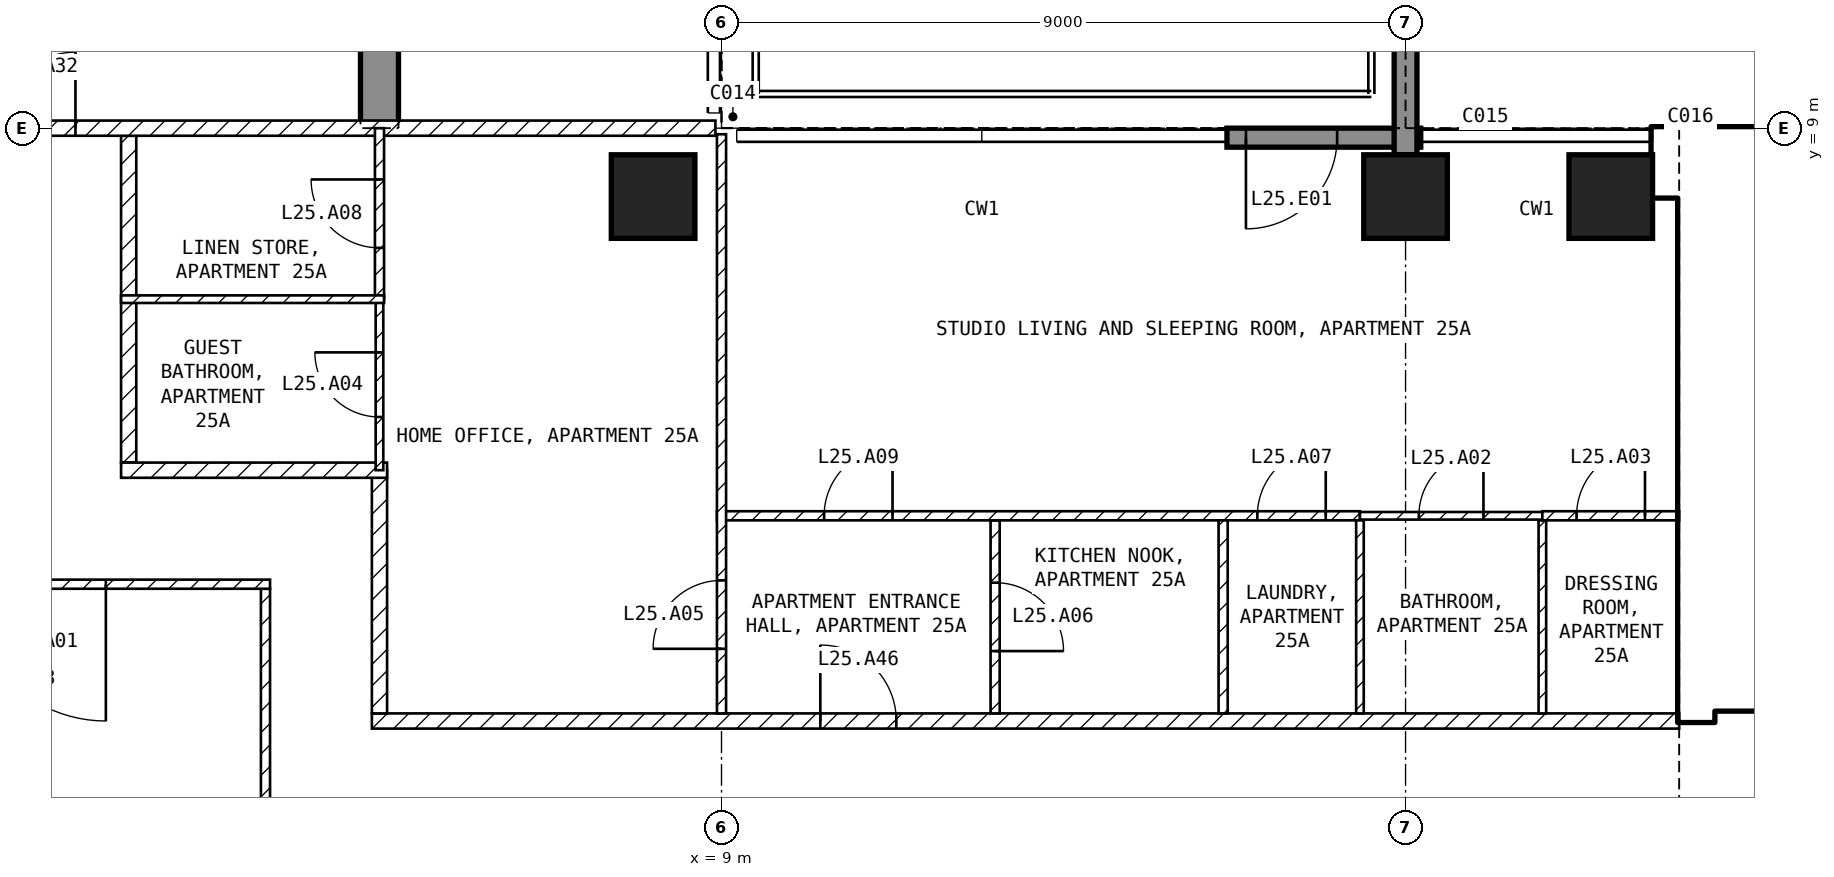
"""IFC4 building model, lengths in metres.
Left out: names, types, materials, properties, quantities, classifications, styles, units other than length and angle.
Written with IfcOpenShell. Run it as: python <this file> out.ifc"""

import sys

from ifc_helpers import new_model, si_unit, direction, frame, frame_2d, origin, origin_2d, place, context, subcontext, project, spatial, polyline, rectangle, outline, extrude, element, fill, save


model = new_model("IFC4")
c1 = context("Model", 3, precision=1e-05, world=origin(), true_north=direction((0.0, 1.0)))
c2 = subcontext(c1, "Body", "Model", "MODEL_VIEW")
j1 = project(units=[si_unit("LENGTHUNIT", "METRE"), si_unit("PLANEANGLEUNIT", "RADIAN")], contexts=[c1])
p1 = place(None, origin())
s1 = spatial("IfcSite", under=j1, at=p1, CompositionType="ELEMENT")
p2 = place(p1, origin())
s2 = spatial("IfcBuilding", under=s1, at=p2, CompositionType="ELEMENT")
p3 = place(p2, frame((0.0, 0.0, 109.4)))
s3 = spatial("IfcBuildingStorey", under=s2, at=p3, CompositionType="ELEMENT", Elevation=109.4)
for number, where, z_axis, x_axis in (
    (1, (8.1, 8.1, -0.25), (0.0, 0.0, 1.0), (1.0, 0.0, 0.0)),
    (2, (18.0, 8.1, -0.25), (0.0, 0.0, 1.0), (1.0, 0.0, 0.0)),
    (3, (20.7, 8.1, -0.25), (0.0, 0.0, 1.0), (1.0, 0.0, 0.0)),
):
    element("IfcColumn", number, at=place(p3, frame(where, z_axis=z_axis, x_axis=x_axis)), inside=s3, PredefinedType="COLUMN", context=c2, shape_type="SweptSolid", body=[
        extrude(rectangle(XDim=1.1, YDim=1.1, at=origin_2d()), origin(), (0.0, 0.0, 1.0), 3.5),
    ])
p4 = place(p3, frame((4.25, 9.0, -0.25), z_axis=(1.0, 0.0, 0.0), x_axis=(0.0, 1.0, 0.0)))
e4 = element("IfcWall", 4, at=p4, inside=s3, PredefinedType="SHEAR", context=c2, shape_type="SweptSolid", body=[
    extrude(outline(polyline([(0.0, 0.0), (2.1, 0.0), (2.1, 2.65), (4.5, 2.65), (4.5, 0.0), (9.9, 0.0), (9.9, 2.65), (12.3, 2.65), (12.3, 0.0), (16.55, 0.0), (16.55, 3.5), (0.0, 3.5), (0.0, 0.0)])), origin(), (0.0, 0.0, 1.0), 0.5),
])
p5 = place(p3, frame((18.2, 8.875, 0.0), z_axis=(0.0, 0.0, 1.0), x_axis=(-1.0, 0.0, 0.0)))
e5 = element("IfcWall", 5, at=p5, inside=s3, PredefinedType="SOLIDWALL", context=c2, shape_type="SweptSolid", body=[
    extrude(rectangle(XDim=2.55, YDim=0.25, at=frame_2d((1.275, 0.0))), origin(), (0.0, 0.0, 1.0), 3.25),
])
p6 = place(p5, frame((1.1, 0.0, 0.0)))
e6 = element("IfcOpeningElement", 6, at=p6, cuts=e5, PredefinedType="OPENING", context=c2, shape_type="SweptSolid", body=[
    extrude(rectangle(XDim=1.2, YDim=2.4, at=frame_2d((0.6, 1.2))), frame((0.0, 0.135, 0.0), z_axis=(0.0, -1.0, 0.0), x_axis=(1.0, 0.0, 0.0)), (0.0, 0.0, 1.0), 0.27),
])
p7 = place(p3, frame((18.0, 8.65, 0.0), z_axis=(0.0, 0.0, 1.0), x_axis=(0.0, 1.0, 0.0)))
e7 = element("IfcWall", 7, at=p7, inside=s3, PredefinedType="SOLIDWALL", context=c2, shape_type="SweptSolid", body=[
    extrude(rectangle(XDim=3.09, YDim=0.3, at=frame_2d((1.545, 0.0))), origin(), (0.0, 0.0, 1.0), 3.25),
])
p8 = place(p3, frame((21.25, 8.55, 0.0), z_axis=(0.0, 0.0, 1.0), x_axis=(1.0, 0.0, 0.0)))
e8 = element("IfcWall", 8, at=p8, inside=s3, PredefinedType="SHEAR", context=c2, shape_type="SweptSolid", body=[
    extrude(rectangle(XDim=8.2, YDim=0.9, at=frame_2d((4.1, 0.0))), origin(), (0.0, 0.0, 1.0), 3.25),
])
p9 = place(p3, frame((21.825, 1.2, 0.0), z_axis=(0.0, 0.0, 1.0), x_axis=(0.0, 1.0, 0.0)))
e9 = element("IfcWall", 9, at=p9, inside=s3, PredefinedType="SHEAR", context=c2, shape_type="SweptSolid", body=[
    extrude(rectangle(XDim=6.9, YDim=0.45, at=frame_2d((3.45, 0.0))), origin(), (0.0, 0.0, 1.0), 3.25),
])
p10 = place(p3, frame((22.05, 1.45, 0.0), z_axis=(0.0, 0.0, 1.0), x_axis=(1.0, 0.0, 0.0)))
e10 = element("IfcWall", 10, at=p10, inside=s3, PredefinedType="SOLIDWALL", context=c2, shape_type="SweptSolid", body=[
    extrude(rectangle(XDim=11.0, YDim=0.2, at=frame_2d((5.5, 0.0))), origin(), (0.0, 0.0, 1.0), 3.25),
])
p11 = place(p10, frame((0.75, 0.0, 0.0)))
e11 = element("IfcOpeningElement", 11, at=p11, cuts=e10, PredefinedType="OPENING", context=c2, shape_type="SweptSolid", body=[
    extrude(rectangle(XDim=1.0, YDim=2.1, at=frame_2d((0.5, 1.05))), frame((0.0, 0.11, 0.0), z_axis=(0.0, -1.0, 0.0), x_axis=(1.0, 0.0, 0.0)), (0.0, 0.0, 1.0), 0.22),
])
p12 = place(p10, frame((3.25, 0.0, 0.0)))
e12 = element("IfcOpeningElement", 12, at=p12, cuts=e10, PredefinedType="OPENING", context=c2, shape_type="SweptSolid", body=[
    extrude(rectangle(XDim=1.0, YDim=2.1, at=frame_2d((0.5, 1.05))), frame((0.0, 0.11, 0.0), z_axis=(0.0, -1.0, 0.0), x_axis=(1.0, 0.0, 0.0)), (0.0, 0.0, 1.0), 0.22),
])
p13 = place(p10, frame((9.075, 0.0, 0.0)))
e13 = element("IfcOpeningElement", 13, at=p13, cuts=e10, PredefinedType="OPENING", context=c2, shape_type="SweptSolid", body=[
    extrude(rectangle(XDim=0.9, YDim=2.1, at=frame_2d((0.45, 1.05))), frame((0.0, 0.11, 0.0), z_axis=(0.0, -1.0, 0.0), x_axis=(1.0, 0.0, 0.0)), (0.0, 0.0, 1.0), 0.22),
])
p14 = place(p3, frame((22.05, 5.15, 0.0), z_axis=(0.0, 0.0, 1.0), x_axis=(1.0, 0.0, 0.0)))
e14 = element("IfcWall", 14, at=p14, inside=s3, PredefinedType="SOLIDWALL", context=c2, shape_type="SweptSolid", body=[
    extrude(rectangle(XDim=6.3, YDim=0.2, at=frame_2d((3.15, 0.0))), origin(), (0.0, 0.0, 1.0), 3.25),
])
p15 = place(p14, frame((0.2, 0.0, 0.0)))
e15 = element("IfcOpeningElement", 15, at=p15, cuts=e14, PredefinedType="OPENING", context=c2, shape_type="SweptSolid", body=[
    extrude(rectangle(XDim=1.0, YDim=2.1, at=frame_2d((0.5, 1.05))), frame((0.0, 0.11, 0.0), z_axis=(0.0, -1.0, 0.0), x_axis=(1.0, 0.0, 0.0)), (0.0, 0.0, 1.0), 0.22),
])
p16 = place(p3, frame((3.0, -2.94, 0.0), z_axis=(0.0, 0.0, 1.0), x_axis=(0.0, 1.0, 0.0)))
e16 = element("IfcWall", 16, at=p16, inside=s3, PredefinedType="PARTITIONING", context=c2, shape_type="SweptSolid", body=[
    extrude(rectangle(XDim=5.88, YDim=0.12, at=frame_2d((2.94, 0.0))), origin(), (0.0, 0.0, 1.0), 3.25),
])
p17 = place(p3, frame((3.06, 3.0, 0.0), z_axis=(0.0, 0.0, 1.0), x_axis=(-1.0, 0.0, 0.0)))
e17 = element("IfcWall", 17, at=p17, inside=s3, PredefinedType="PARTITIONING", context=c2, shape_type="SweptSolid", body=[
    extrude(rectangle(XDim=6.12, YDim=0.12, at=frame_2d((3.06, 0.0))), origin(), (0.0, 0.0, 1.0), 3.25),
])
p18 = place(p17, frame((2.16, 0.0, 0.0)))
e18 = element("IfcOpeningElement", 18, at=p18, cuts=e17, PredefinedType="OPENING", context=c2, shape_type="SweptSolid", body=[
    extrude(rectangle(XDim=1.8, YDim=2.1, at=frame_2d((0.9, 1.05))), frame((0.0, 0.07, 0.0), z_axis=(0.0, -1.0, 0.0), x_axis=(1.0, 0.0, 0.0)), (0.0, 0.0, 1.0), 0.14),
])
p19 = place(p3, frame((4.4, 1.2, 0.0), z_axis=(0.0, 0.0, 1.0), x_axis=(1.0, 0.0, 0.0)))
e19 = element("IfcWall", 19, at=p19, inside=s3, PredefinedType="PARTITIONING", context=c2, shape_type="SweptSolid", body=[
    extrude(rectangle(XDim=17.2, YDim=0.2, at=frame_2d((8.6, 0.0))), origin(), (0.0, 0.0, 1.0), 3.25),
])
p20 = place(p19, frame((5.9, 0.0, 0.0)))
e20 = element("IfcOpeningElement", 20, at=p20, cuts=e19, PredefinedType="OPENING", context=c2, shape_type="SweptSolid", body=[
    extrude(rectangle(XDim=1.0, YDim=2.1, at=frame_2d((0.5, 1.05))), frame((0.0, 0.11, 0.0), z_axis=(0.0, -1.0, 0.0), x_axis=(1.0, 0.0, 0.0)), (0.0, 0.0, 1.0), 0.22),
])
p21 = place(p3, frame((4.5, 4.5, 0.0), z_axis=(0.0, 0.0, 1.0), x_axis=(0.0, -1.0, 0.0)))
e21 = element("IfcWall", 21, at=p21, inside=s3, PredefinedType="PARTITIONING", context=c2, shape_type="SweptSolid", body=[
    extrude(rectangle(XDim=3.2, YDim=0.2, at=frame_2d((1.6, 0.0))), origin(), (0.0, 0.0, 1.0), 3.25),
])
p22 = place(p3, frame((1.2, 8.9, 0.0), z_axis=(0.0, 0.0, 1.0), x_axis=(0.0, -1.0, 0.0)))
e22 = element("IfcWall", 22, at=p22, inside=s3, PredefinedType="PARTITIONING", context=c2, shape_type="SweptSolid", body=[
    extrude(rectangle(XDim=4.3, YDim=0.2, at=frame_2d((2.15, 0.0))), origin(), (0.0, 0.0, 1.0), 3.25),
])
p23 = place(p3, frame((1.1, 4.5, 0.0), z_axis=(0.0, 0.0, 1.0), x_axis=(1.0, 0.0, 0.0)))
e23 = element("IfcWall", 23, at=p23, inside=s3, PredefinedType="PARTITIONING", context=c2, shape_type="SweptSolid", body=[
    extrude(rectangle(XDim=3.5, YDim=0.2, at=frame_2d((1.75, 0.0))), origin(), (0.0, 0.0, 1.0), 3.25),
])
p24 = place(p3, frame((-8.92, 9.0, 0.0), z_axis=(0.0, 0.0, 1.0), x_axis=(1.0, 0.0, 0.0)))
e24 = element("IfcWall", 24, at=p24, inside=s3, PredefinedType="PARTITIONING", context=c2, shape_type="SweptSolid", body=[
    extrude(rectangle(XDim=17.84, YDim=0.2, at=frame_2d((8.92, 0.0))), origin(), (0.0, 0.0, 1.0), 3.25),
])
p25 = place(p24, frame((8.42, 0.0, 0.0)))
e25 = element("IfcOpeningElement", 25, at=p25, cuts=e24, PredefinedType="OPENING", context=c2, shape_type="SweptSolid", body=[
    extrude(rectangle(XDim=1.0, YDim=2.1, at=frame_2d((0.5, 1.05))), frame((0.0, 0.11, 0.0), z_axis=(0.0, -1.0, 0.0), x_axis=(1.0, 0.0, 0.0)), (0.0, 0.0, 1.0), 0.22),
])
p26 = place(p3, frame((12.6, 3.84, 0.0), z_axis=(0.0, 0.0, 1.0), x_axis=(0.0, -1.0, 0.0)))
e26 = element("IfcWall", 26, at=p26, inside=s3, PredefinedType="PARTITIONING", context=c2, shape_type="SweptSolid", body=[
    extrude(rectangle(XDim=2.54, YDim=0.12, at=frame_2d((1.27, 0.0))), origin(), (0.0, 0.0, 1.0), 3.25),
])
p27 = place(p26, frame((0.82, 0.0, 0.0)))
e27 = element("IfcOpeningElement", 27, at=p27, cuts=e26, PredefinedType="OPENING", context=c2, shape_type="SweptSolid", body=[
    extrude(rectangle(XDim=0.9, YDim=2.1, at=frame_2d((0.45, 1.05))), frame((0.0, 0.07, 0.0), z_axis=(0.0, -1.0, 0.0), x_axis=(1.0, 0.0, 0.0)), (0.0, 0.0, 1.0), 0.14),
])
p28 = place(p3, frame((8.94, 3.9, 0.0), z_axis=(0.0, 0.0, 1.0), x_axis=(1.0, 0.0, 0.0)))
e28 = element("IfcWall", 28, at=p28, inside=s3, PredefinedType="PARTITIONING", context=c2, shape_type="SweptSolid", body=[
    extrude(rectangle(XDim=8.46, YDim=0.12, at=frame_2d((4.23, 0.0))), origin(), (0.0, 0.0, 1.0), 3.25),
])
p29 = place(p28, frame((7.11, 0.0, 0.0)))
e29 = element("IfcOpeningElement", 29, at=p29, cuts=e28, PredefinedType="OPENING", context=c2, shape_type="SweptSolid", body=[
    extrude(rectangle(XDim=0.9, YDim=2.1, at=frame_2d((0.45, 1.05))), frame((0.0, 0.07, 0.0), z_axis=(0.0, -1.0, 0.0), x_axis=(1.0, 0.0, 0.0)), (0.0, 0.0, 1.0), 0.14),
])
p30 = place(p28, frame((1.41, 0.0, 0.0)))
e30 = element("IfcOpeningElement", 30, at=p30, cuts=e28, PredefinedType="OPENING", context=c2, shape_type="SweptSolid", body=[
    extrude(rectangle(XDim=0.9, YDim=2.1, at=frame_2d((0.45, 1.05))), frame((0.0, 0.07, 0.0), z_axis=(0.0, -1.0, 0.0), x_axis=(1.0, 0.0, 0.0)), (0.0, 0.0, 1.0), 0.14),
])
p31 = place(p3, frame((9.0, 1.3, 0.0), z_axis=(0.0, 0.0, 1.0), x_axis=(0.0, 1.0, 0.0)))
e31 = element("IfcWall", 31, at=p31, inside=s3, PredefinedType="PARTITIONING", context=c2, shape_type="SweptSolid", body=[
    extrude(rectangle(XDim=7.62, YDim=0.12, at=frame_2d((3.81, 0.0))), origin(), (0.0, 0.0, 1.0), 3.25),
])
p32 = place(p31, frame((0.85, 0.0, 0.0)))
e32 = element("IfcOpeningElement", 32, at=p32, cuts=e31, PredefinedType="OPENING", context=c2, shape_type="SweptSolid", body=[
    extrude(rectangle(XDim=0.9, YDim=2.1, at=frame_2d((0.45, 1.05))), frame((0.0, 0.07, 0.0), z_axis=(0.0, -1.0, 0.0), x_axis=(1.0, 0.0, 0.0)), (0.0, 0.0, 1.0), 0.14),
])
p33 = place(p3, frame((15.6, 3.84, 0.0), z_axis=(0.0, 0.0, 1.0), x_axis=(0.0, -1.0, 0.0)))
e33 = element("IfcWall", 33, at=p33, inside=s3, PredefinedType="PARTITIONING", context=c2, shape_type="SweptSolid", body=[
    extrude(rectangle(XDim=2.54, YDim=0.12, at=frame_2d((1.27, 0.0))), origin(), (0.0, 0.0, 1.0), 3.25),
])
for number, where, z_axis, x_axis in (
    (34, (17.4, 3.84, 0.0), (0.0, 0.0, 1.0), (0.0, -1.0, 0.0)),
    (35, (19.8, 3.84, 0.0), (0.0, 0.0, 1.0), (0.0, -1.0, 0.0)),
):
    element("IfcWall", number, at=place(p3, frame(where, z_axis=z_axis, x_axis=x_axis)), inside=s3, PredefinedType="PARTITIONING", context=c2, shape_type="SweptSolid", body=[
        extrude(rectangle(XDim=2.54, YDim=0.1, at=frame_2d((1.27, 0.0))), origin(), (0.0, 0.0, 1.0), 3.25),
    ])
p34 = place(p3, frame((17.4, 3.9, 0.0), z_axis=(0.0, 0.0, 1.0), x_axis=(1.0, 0.0, 0.0)))
e36 = element("IfcWall", 36, at=p34, inside=s3, PredefinedType="PARTITIONING", context=c2, shape_type="SweptSolid", body=[
    extrude(rectangle(XDim=2.4, YDim=0.1, at=frame_2d((1.2, 0.0))), origin(), (0.0, 0.0, 1.0), 3.25),
])
p35 = place(p34, frame((0.775, 0.0, 0.0)))
e37 = element("IfcOpeningElement", 37, at=p35, cuts=e36, PredefinedType="OPENING", context=c2, shape_type="SweptSolid", body=[
    extrude(rectangle(XDim=0.85, YDim=2.1, at=frame_2d((0.425, 1.05))), frame((0.0, 0.06, 0.0), z_axis=(0.0, -1.0, 0.0), x_axis=(1.0, 0.0, 0.0)), (0.0, 0.0, 1.0), 0.12),
])
p36 = place(p3, frame((19.8, 3.9, 0.0), z_axis=(0.0, 0.0, 1.0), x_axis=(1.0, 0.0, 0.0)))
e38 = element("IfcWall", 38, at=p36, inside=s3, PredefinedType="PARTITIONING", context=c2, shape_type="SweptSolid", body=[
    extrude(rectangle(XDim=1.8, YDim=0.12, at=frame_2d((0.9, 0.0))), origin(), (0.0, 0.0, 1.0), 3.25),
])
p37 = place(p36, frame((0.45, 0.0, 0.0)))
e39 = element("IfcOpeningElement", 39, at=p37, cuts=e38, PredefinedType="OPENING", context=c2, shape_type="SweptSolid", body=[
    extrude(rectangle(XDim=0.9, YDim=2.1, at=frame_2d((0.45, 1.05))), frame((0.0, 0.07, 0.0), z_axis=(0.0, -1.0, 0.0), x_axis=(1.0, 0.0, 0.0)), (0.0, 0.0, 1.0), 0.14),
])
p38 = place(p3, frame((4.5, 4.5, 0.0), z_axis=(0.0, 0.0, 1.0), x_axis=(0.0, 1.0, 0.0)))
e40 = element("IfcWall", 40, at=p38, inside=s3, PredefinedType="PARTITIONING", context=c2, shape_type="SweptSolid", body=[
    extrude(rectangle(XDim=2.25, YDim=0.1, at=frame_2d((1.125, 0.0))), origin(), (0.0, 0.0, 1.0), 3.25),
])
p39 = place(p38, frame((0.7, 0.0, 0.0)))
e41 = element("IfcOpeningElement", 41, at=p39, cuts=e40, PredefinedType="OPENING", context=c2, shape_type="SweptSolid", body=[
    extrude(rectangle(XDim=0.85, YDim=2.1, at=frame_2d((0.425, 1.05))), frame((0.0, 0.06, 0.0), z_axis=(0.0, -1.0, 0.0), x_axis=(1.0, 0.0, 0.0)), (0.0, 0.0, 1.0), 0.12),
])
p40 = place(p3, frame((4.5, 6.75, 0.0), z_axis=(0.0, 0.0, 1.0), x_axis=(0.0, 1.0, 0.0)))
e42 = element("IfcWall", 42, at=p40, inside=s3, PredefinedType="PARTITIONING", context=c2, shape_type="SweptSolid", body=[
    extrude(rectangle(XDim=2.25, YDim=0.12, at=frame_2d((1.125, 0.0))), origin(), (0.0, 0.0, 1.0), 3.25),
])
p41 = place(p40, frame((0.675, 0.0, 0.0)))
e43 = element("IfcOpeningElement", 43, at=p41, cuts=e42, PredefinedType="OPENING", context=c2, shape_type="SweptSolid", body=[
    extrude(rectangle(XDim=0.9, YDim=2.1, at=frame_2d((0.45, 1.05))), frame((0.0, 0.07, 0.0), z_axis=(0.0, -1.0, 0.0), x_axis=(1.0, 0.0, 0.0)), (0.0, 0.0, 1.0), 0.14),
])
p42 = place(p3, frame((1.1, 6.75, 0.0), z_axis=(0.0, 0.0, 1.0), x_axis=(1.0, 0.0, 0.0)))
e44 = element("IfcWall", 44, at=p42, inside=s3, PredefinedType="PARTITIONING", context=c2, shape_type="SweptSolid", body=[
    extrude(rectangle(XDim=3.46, YDim=0.1, at=frame_2d((1.73, 0.0))), origin(), (0.0, 0.0, 1.0), 3.25),
])
p43 = place(p6, origin())
e45 = element("IfcDoor", 45, at=p43, inside=s3, OperationType="SINGLE_SWING_RIGHT", PredefinedType="DOOR", context=c2, shape_type="SweptSolid", body=[
    extrude(rectangle(XDim=1.2, YDim=2.4, at=frame_2d((0.6, 1.2))), frame((0.0, 0.025, 0.0), z_axis=(0.0, -1.0, 0.0), x_axis=(1.0, 0.0, 0.0)), (0.0, 0.0, 1.0), 0.05),
])
fill(e6, e45)
p44 = place(p15, origin())
e46 = element("IfcDoor", 46, at=p44, inside=s3, OperationType="SINGLE_SWING_LEFT", PredefinedType="DOOR", context=c2, shape_type="SweptSolid", body=[
    extrude(rectangle(XDim=1.0, YDim=2.1, at=frame_2d((0.5, 1.05))), frame((0.0, 0.025, 0.0), z_axis=(0.0, -1.0, 0.0), x_axis=(1.0, 0.0, 0.0)), (0.0, 0.0, 1.0), 0.05),
])
fill(e15, e46)
p45 = place(p18, origin())
e47 = element("IfcDoor", 47, at=p45, inside=s3, OperationType="SINGLE_SWING_LEFT", PredefinedType="DOOR", context=c2, shape_type="SweptSolid", body=[
    extrude(rectangle(XDim=1.8, YDim=2.1, at=frame_2d((0.9, 1.05))), frame((0.0, 0.025, 0.0), z_axis=(0.0, -1.0, 0.0), x_axis=(1.0, 0.0, 0.0)), (0.0, 0.0, 1.0), 0.05),
])
fill(e18, e47)
p46 = place(p35, origin())
e48 = element("IfcDoor", 48, at=p46, inside=s3, OperationType="SINGLE_SWING_RIGHT", PredefinedType="DOOR", context=c2, shape_type="SweptSolid", body=[
    extrude(rectangle(XDim=0.85, YDim=2.1, at=frame_2d((0.425, 1.05))), frame((0.0, 0.025, 0.0), z_axis=(0.0, -1.0, 0.0), x_axis=(1.0, 0.0, 0.0)), (0.0, 0.0, 1.0), 0.05),
])
fill(e37, e48)
p47 = place(p37, origin())
e49 = element("IfcDoor", 49, at=p47, inside=s3, OperationType="SINGLE_SWING_RIGHT", PredefinedType="DOOR", context=c2, shape_type="SweptSolid", body=[
    extrude(rectangle(XDim=0.9, YDim=2.1, at=frame_2d((0.45, 1.05))), frame((0.0, 0.025, 0.0), z_axis=(0.0, -1.0, 0.0), x_axis=(1.0, 0.0, 0.0)), (0.0, 0.0, 1.0), 0.05),
])
fill(e39, e49)
p48 = place(p39, origin())
e50 = element("IfcDoor", 50, at=p48, inside=s3, OperationType="SINGLE_SWING_RIGHT", PredefinedType="DOOR", context=c2, shape_type="SweptSolid", body=[
    extrude(rectangle(XDim=0.85, YDim=2.1, at=frame_2d((0.425, 1.05))), frame((0.0, 0.025, 0.0), z_axis=(0.0, -1.0, 0.0), x_axis=(1.0, 0.0, 0.0)), (0.0, 0.0, 1.0), 0.05),
])
fill(e41, e50)
p49 = place(p32, origin())
e51 = element("IfcDoor", 51, at=p49, inside=s3, OperationType="SINGLE_SWING_LEFT", PredefinedType="DOOR", context=c2, shape_type="SweptSolid", body=[
    extrude(rectangle(XDim=0.9, YDim=2.1, at=frame_2d((0.45, 1.05))), frame((0.0, 0.025, 0.0), z_axis=(0.0, -1.0, 0.0), x_axis=(1.0, 0.0, 0.0)), (0.0, 0.0, 1.0), 0.05),
])
fill(e32, e51)
p50 = place(p27, origin())
e52 = element("IfcDoor", 52, at=p50, inside=s3, OperationType="SINGLE_SWING_RIGHT", PredefinedType="DOOR", context=c2, shape_type="SweptSolid", body=[
    extrude(rectangle(XDim=0.9, YDim=2.1, at=frame_2d((0.45, 1.05))), frame((0.0, 0.025, 0.0), z_axis=(0.0, -1.0, 0.0), x_axis=(1.0, 0.0, 0.0)), (0.0, 0.0, 1.0), 0.05),
])
fill(e27, e52)
p51 = place(p29, origin())
e53 = element("IfcDoor", 53, at=p51, inside=s3, OperationType="SINGLE_SWING_RIGHT", PredefinedType="DOOR", context=c2, shape_type="SweptSolid", body=[
    extrude(rectangle(XDim=0.9, YDim=2.1, at=frame_2d((0.45, 1.05))), frame((0.0, 0.025, 0.0), z_axis=(0.0, -1.0, 0.0), x_axis=(1.0, 0.0, 0.0)), (0.0, 0.0, 1.0), 0.05),
])
fill(e29, e53)
p52 = place(p41, origin())
e54 = element("IfcDoor", 54, at=p52, inside=s3, OperationType="SINGLE_SWING_RIGHT", PredefinedType="DOOR", context=c2, shape_type="SweptSolid", body=[
    extrude(rectangle(XDim=0.9, YDim=2.1, at=frame_2d((0.45, 1.05))), frame((0.0, 0.025, 0.0), z_axis=(0.0, -1.0, 0.0), x_axis=(1.0, 0.0, 0.0)), (0.0, 0.0, 1.0), 0.05),
])
fill(e43, e54)
p53 = place(p30, origin())
e55 = element("IfcDoor", 55, at=p53, inside=s3, OperationType="SINGLE_SWING_RIGHT", PredefinedType="DOOR", context=c2, shape_type="SweptSolid", body=[
    extrude(rectangle(XDim=0.9, YDim=2.1, at=frame_2d((0.45, 1.05))), frame((0.0, 0.025, 0.0), z_axis=(0.0, -1.0, 0.0), x_axis=(1.0, 0.0, 0.0)), (0.0, 0.0, 1.0), 0.05),
])
fill(e30, e55)
p54 = place(p25, origin())
e56 = element("IfcDoor", 56, at=p54, inside=s3, OperationType="SINGLE_SWING_RIGHT", PredefinedType="DOOR", context=c2, shape_type="SweptSolid", body=[
    extrude(rectangle(XDim=1.0, YDim=2.1, at=frame_2d((0.5, 1.05))), frame((0.0, 0.025, 0.0), z_axis=(0.0, -1.0, 0.0), x_axis=(1.0, 0.0, 0.0)), (0.0, 0.0, 1.0), 0.05),
])
fill(e25, e56)
p55 = place(p20, origin())
e57 = element("IfcDoor", 57, at=p55, inside=s3, OperationType="SINGLE_SWING_LEFT", PredefinedType="DOOR", context=c2, shape_type="SweptSolid", body=[
    extrude(rectangle(XDim=1.0, YDim=2.1, at=frame_2d((0.5, 1.05))), frame((0.0, 0.025, 0.0), z_axis=(0.0, -1.0, 0.0), x_axis=(1.0, 0.0, 0.0)), (0.0, 0.0, 1.0), 0.05),
])
fill(e20, e57)
save(model, sys.argv[1])
